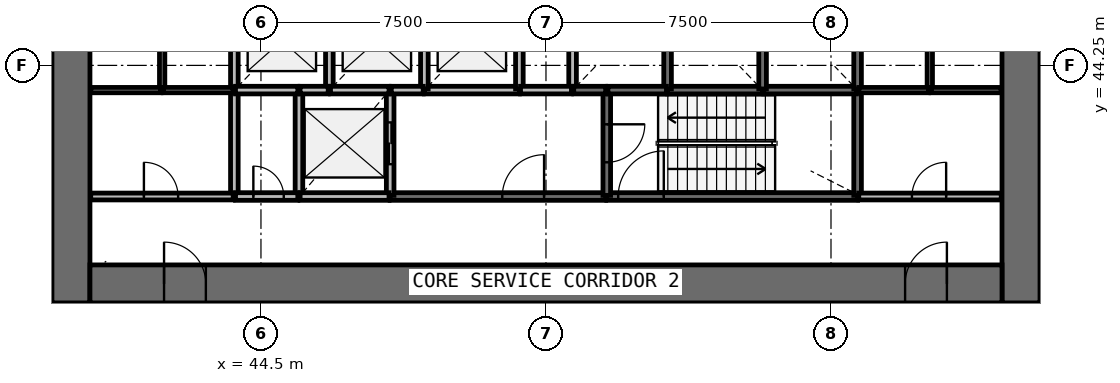
"""IFC4 building model, lengths in metres.
Left out: names, types, materials, properties, quantities, classifications, styles, units other than length and angle.
Written with IfcOpenShell. Run it as: python <this file> out.ifc"""

import sys

from ifc_helpers import new_model, si_unit, direction, frame, frame_2d, origin, place, context, subcontext, project, spatial, rectangle, extrude, source, transform, mapped, element, fill, save


model = new_model("IFC4")
c1 = context("Model", 3, precision=1e-05, world=origin(), true_north=direction((0.0, 1.0)))
c2 = subcontext(c1, "Body", "Model", "MODEL_VIEW")
j1 = project(units=[si_unit("LENGTHUNIT", "METRE"), si_unit("PLANEANGLEUNIT", "RADIAN")], contexts=[c1])
p1 = place(None, origin())
s1 = spatial("IfcSite", under=j1, at=p1, CompositionType="ELEMENT")
p2 = place(p1, origin())
s2 = spatial("IfcBuilding", under=s1, at=p2, CompositionType="ELEMENT")
p3 = place(p2, frame((0.0, 0.0, 5.0)))
s3 = spatial("IfcBuildingStorey", under=s2, at=p3, CompositionType="ELEMENT", Elevation=5.0)
p4 = place(p3, frame((64.5, 38.0, 0.0), z_axis=(0.0, 0.0, 1.0), x_axis=(0.0, 1.0, 0.0)))
e1 = element("IfcWall", 1, at=p4, inside=s3, PredefinedType="SHEAR", context=c2, shape_type="SweptSolid", body=[
    extrude(rectangle(XDim=20.0, YDim=1.0, at=frame_2d((10.0, 0.0))), origin(), (0.0, 0.0, 1.0), 4.4),
])
p5 = place(p4, frame((9.1, 0.0, 0.0)))
e2 = element("IfcOpeningElement", 2, at=p5, cuts=e1, PredefinedType="OPENING", context=c2, shape_type="SweptSolid", body=[
    extrude(rectangle(XDim=1.8, YDim=2.1, at=frame_2d((0.9, 1.05))), frame((0.0, 0.51, 0.0), z_axis=(0.0, -1.0, 0.0), x_axis=(1.0, 0.0, 0.0)), (0.0, 0.0, 1.0), 1.02),
])
p6 = place(p3, frame((39.5, 58.0, 0.0), z_axis=(0.0, 0.0, 1.0), x_axis=(0.0, -1.0, 0.0)))
e3 = element("IfcWall", 3, at=p6, inside=s3, PredefinedType="SHEAR", context=c2, shape_type="SweptSolid", body=[
    extrude(rectangle(XDim=20.0, YDim=1.0, at=frame_2d((10.0, 0.0))), origin(), (0.0, 0.0, 1.0), 4.4),
])
p7 = place(p6, frame((9.1, 0.0, 0.0)))
e4 = element("IfcOpeningElement", 4, at=p7, cuts=e3, PredefinedType="OPENING", context=c2, shape_type="SweptSolid", body=[
    extrude(rectangle(XDim=1.8, YDim=2.1, at=frame_2d((0.9, 1.05))), frame((0.0, 0.51, 0.0), z_axis=(0.0, -1.0, 0.0), x_axis=(1.0, 0.0, 0.0)), (0.0, 0.0, 1.0), 1.02),
])
p8 = place(p3, frame((40.0, 38.5, 0.0), z_axis=(0.0, 0.0, 1.0), x_axis=(1.0, 0.0, 0.0)))
e5 = element("IfcWall", 5, at=p8, inside=s3, PredefinedType="SHEAR", context=c2, shape_type="SweptSolid", body=[
    extrude(rectangle(XDim=24.0, YDim=1.0, at=frame_2d((12.0, 0.0))), origin(), (0.0, 0.0, 1.0), 4.4),
])
p9 = place(p8, frame((21.45, 0.0, 0.0)))
e6 = element("IfcOpeningElement", 6, at=p9, cuts=e5, PredefinedType="OPENING", context=c2, shape_type="SweptSolid", body=[
    extrude(rectangle(XDim=1.1, YDim=2.1, at=frame_2d((0.55, 1.05))), frame((0.0, 0.51, 0.0), z_axis=(0.0, -1.0, 0.0), x_axis=(1.0, 0.0, 0.0)), (0.0, 0.0, 1.0), 1.02),
])
p10 = place(p8, frame((1.95, 0.0, 0.0)))
e7 = element("IfcOpeningElement", 7, at=p10, cuts=e5, PredefinedType="OPENING", context=c2, shape_type="SweptSolid", body=[
    extrude(rectangle(XDim=1.1, YDim=2.1, at=frame_2d((0.55, 1.05))), frame((0.0, 0.51, 0.0), z_axis=(0.0, -1.0, 0.0), x_axis=(1.0, 0.0, 0.0)), (0.0, 0.0, 1.0), 1.02),
])
p11 = place(p3, frame((53.6, 40.8, 0.0), z_axis=(0.0, 0.0, 1.0), x_axis=(1.0, 0.0, 0.0)))
e8 = element("IfcWall", 8, at=p11, inside=s3, PredefinedType="SOLIDWALL", context=c2, shape_type="SweptSolid", body=[
    extrude(rectangle(XDim=6.6, YDim=0.2, at=frame_2d((3.3, 0.0))), origin(), (0.0, 0.0, 1.0), 4.05),
])
p12 = place(p11, frame((0.3, 0.0, 0.0)))
e9 = element("IfcOpeningElement", 9, at=p12, cuts=e8, PredefinedType="OPENING", context=c2, shape_type="SweptSolid", body=[
    extrude(rectangle(XDim=1.2, YDim=2.1, at=frame_2d((0.6, 1.05))), frame((0.0, 0.11, 0.0), z_axis=(0.0, -1.0, 0.0), x_axis=(1.0, 0.0, 0.0)), (0.0, 0.0, 1.0), 0.22),
])
p13 = place(p3, frame((47.9, 40.8, 0.0), z_axis=(0.0, 0.0, 1.0), x_axis=(1.0, 0.0, 0.0)))
e10 = element("IfcWall", 10, at=p13, inside=s3, PredefinedType="SOLIDWALL", context=c2, shape_type="SweptSolid", body=[
    extrude(rectangle(XDim=5.67, YDim=0.2, at=frame_2d((2.835, 0.0))), origin(), (0.0, 0.0, 1.0), 4.05),
])
p14 = place(p13, frame((2.95, 0.0, 0.0)))
e11 = element("IfcOpeningElement", 11, at=p14, cuts=e10, PredefinedType="OPENING", context=c2, shape_type="SweptSolid", body=[
    extrude(rectangle(XDim=1.1, YDim=2.1, at=frame_2d((0.55, 1.05))), frame((0.0, 0.11, 0.0), z_axis=(0.0, -1.0, 0.0), x_axis=(1.0, 0.0, 0.0)), (0.0, 0.0, 1.0), 0.22),
])
for number, where, z_axis, x_axis in (
    (12, (43.8, 43.6, 0.0), (0.0, 0.0, 1.0), (0.0, -1.0, 0.0)),
    (13, (45.5, 43.6, 0.0), (0.0, 0.0, 1.0), (0.0, -1.0, 0.0)),
):
    element("IfcWall", number, at=place(p3, frame(where, z_axis=z_axis, x_axis=x_axis)), inside=s3, PredefinedType="SOLIDWALL", context=c2, shape_type="SweptSolid", body=[
        extrude(rectangle(XDim=2.8, YDim=0.2, at=frame_2d((1.4, 0.0))), origin(), (0.0, 0.0, 1.0), 4.05),
    ])
p15 = place(p3, frame((47.9, 40.83, 0.0), z_axis=(0.0, 0.0, 1.0), x_axis=(0.0, 1.0, 0.0)))
e14 = element("IfcWall", 14, at=p15, inside=s3, PredefinedType="SOLIDWALL", context=c2, shape_type="SweptSolid", body=[
    extrude(rectangle(XDim=2.77, YDim=0.2, at=frame_2d((1.385, 0.0))), origin(), (0.0, 0.0, 1.0), 4.05),
])
p16 = place(p15, frame((0.82, 0.0, 0.0)))
e15 = element("IfcOpeningElement", 15, at=p16, cuts=e14, PredefinedType="OPENING", context=c2, shape_type="SweptSolid", body=[
    extrude(rectangle(XDim=1.1, YDim=2.1, at=frame_2d((0.55, 1.05))), frame((0.0, 0.11, 0.0), z_axis=(0.0, -1.0, 0.0), x_axis=(1.0, 0.0, 0.0)), (0.0, 0.0, 1.0), 0.22),
])
p17 = place(p3, frame((60.2, 40.83, 0.0), z_axis=(0.0, 0.0, 1.0), x_axis=(0.0, 1.0, 0.0)))
e16 = element("IfcWall", 16, at=p17, inside=s3, PredefinedType="SOLIDWALL", context=c2, shape_type="SweptSolid", body=[
    extrude(rectangle(XDim=2.77, YDim=0.2, at=frame_2d((1.385, 0.0))), origin(), (0.0, 0.0, 1.0), 4.05),
])
p18 = place(p3, frame((53.6, 43.6, 0.0), z_axis=(0.0, 0.0, 1.0), x_axis=(0.0, -1.0, 0.0)))
e17 = element("IfcWall", 17, at=p18, inside=s3, PredefinedType="SOLIDWALL", context=c2, shape_type="SweptSolid", body=[
    extrude(rectangle(XDim=2.77, YDim=0.2, at=frame_2d((1.385, 0.0))), origin(), (0.0, 0.0, 1.0), 4.05),
])
p19 = place(p18, frame((0.9, 0.0, 0.0)))
e18 = element("IfcOpeningElement", 18, at=p19, cuts=e17, PredefinedType="OPENING", context=c2, shape_type="SweptSolid", body=[
    extrude(rectangle(XDim=1.0, YDim=2.1, at=frame_2d((0.5, 1.05))), frame((0.0, 0.11, 0.0), z_axis=(0.0, -1.0, 0.0), x_axis=(1.0, 0.0, 0.0)), (0.0, 0.0, 1.0), 0.22),
])
for number, where, z_axis, x_axis in (
    (19, (48.8, 43.6, 0.0), (0.0, 0.0, 1.0), (1.0, 0.0, 0.0)),
    (20, (55.2, 43.6, 0.0), (0.0, 0.0, 1.0), (1.0, 0.0, 0.0)),
):
    element("IfcWall", number, at=place(p3, frame(where, z_axis=z_axis, x_axis=x_axis)), inside=s3, PredefinedType="SOLIDWALL", context=c2, shape_type="SweptSolid", body=[
        extrude(rectangle(XDim=2.5, YDim=0.2, at=frame_2d((1.25, 0.0))), origin(), (0.0, 0.0, 1.0), 4.05),
    ])
p20 = place(p3, frame((57.73, 43.6, 0.0), z_axis=(0.0, 0.0, 1.0), x_axis=(1.0, 0.0, 0.0)))
e21 = element("IfcWall", 21, at=p20, inside=s3, PredefinedType="SOLIDWALL", context=c2, shape_type="SweptSolid", body=[
    extrude(rectangle(XDim=2.44, YDim=0.2, at=frame_2d((1.22, 0.0))), origin(), (0.0, 0.0, 1.0), 4.05),
])
p21 = place(p3, frame((45.53, 40.8, 0.0), z_axis=(0.0, 0.0, 1.0), x_axis=(1.0, 0.0, 0.0)))
e22 = element("IfcWall", 22, at=p21, inside=s3, PredefinedType="SOLIDWALL", context=c2, shape_type="SweptSolid", body=[
    extrude(rectangle(XDim=2.34, YDim=0.2, at=frame_2d((1.17, 0.0))), origin(), (0.0, 0.0, 1.0), 4.05),
])
p22 = place(p3, frame((43.8, 45.99, 0.0), z_axis=(0.0, 0.0, 1.0), x_axis=(0.0, -1.0, 0.0)))
e23 = element("IfcWall", 23, at=p22, inside=s3, PredefinedType="SOLIDWALL", context=c2, shape_type="SweptSolid", body=[
    extrude(rectangle(XDim=2.36, YDim=0.2, at=frame_2d((1.18, 0.0))), origin(), (0.0, 0.0, 1.0), 4.05),
])
p23 = place(p3, frame((46.3, 43.6, 0.0), z_axis=(0.0, 0.0, 1.0), x_axis=(0.0, 1.0, 0.0)))
e24 = element("IfcWall", 24, at=p23, inside=s3, PredefinedType="SOLIDWALL", context=c2, shape_type="SweptSolid", body=[
    extrude(rectangle(XDim=2.39, YDim=0.2, at=frame_2d((1.195, 0.0))), origin(), (0.0, 0.0, 1.0), 4.05),
])
for number, where, z_axis, x_axis in (
    (25, (48.8, 43.63, 0.0), (0.0, 0.0, 1.0), (0.0, 1.0, 0.0)),
    (26, (51.3, 43.63, 0.0), (0.0, 0.0, 1.0), (0.0, 1.0, 0.0)),
):
    element("IfcWall", number, at=place(p3, frame(where, z_axis=z_axis, x_axis=x_axis)), inside=s3, PredefinedType="SOLIDWALL", context=c2, shape_type="SweptSolid", body=[
        extrude(rectangle(XDim=2.36, YDim=0.2, at=frame_2d((1.18, 0.0))), origin(), (0.0, 0.0, 1.0), 4.05),
    ])
p24 = place(p3, frame((52.7, 45.99, 0.0), z_axis=(0.0, 0.0, 1.0), x_axis=(0.0, -1.0, 0.0)))
e27 = element("IfcWall", 27, at=p24, inside=s3, PredefinedType="SOLIDWALL", context=c2, shape_type="SweptSolid", body=[
    extrude(rectangle(XDim=2.39, YDim=0.2, at=frame_2d((1.195, 0.0))), origin(), (0.0, 0.0, 1.0), 4.05),
])
for number, where, z_axis, x_axis in (
    (28, (55.2, 43.63, 0.0), (0.0, 0.0, 1.0), (0.0, 1.0, 0.0)),
    (29, (57.7, 43.63, 0.0), (0.0, 0.0, 1.0), (0.0, 1.0, 0.0)),
    (30, (60.2, 43.63, 0.0), (0.0, 0.0, 1.0), (0.0, 1.0, 0.0)),
):
    element("IfcWall", number, at=place(p3, frame(where, z_axis=z_axis, x_axis=x_axis)), inside=s3, PredefinedType="SOLIDWALL", context=c2, shape_type="SweptSolid", body=[
        extrude(rectangle(XDim=2.36, YDim=0.2, at=frame_2d((1.18, 0.0))), origin(), (0.0, 0.0, 1.0), 4.05),
    ])
p25 = place(p3, frame((43.83, 43.6, 0.0), z_axis=(0.0, 0.0, 1.0), x_axis=(1.0, 0.0, 0.0)))
e31 = element("IfcWall", 31, at=p25, inside=s3, PredefinedType="SOLIDWALL", context=c2, shape_type="SweptSolid", body=[
    extrude(rectangle(XDim=1.64, YDim=0.2, at=frame_2d((0.82, 0.0))), origin(), (0.0, 0.0, 1.0), 4.05),
])
p26 = place(p3, frame((43.83, 40.8, 0.0), z_axis=(0.0, 0.0, 1.0), x_axis=(1.0, 0.0, 0.0)))
e32 = element("IfcWall", 32, at=p26, inside=s3, PredefinedType="SOLIDWALL", context=c2, shape_type="SweptSolid", body=[
    extrude(rectangle(XDim=1.64, YDim=0.2, at=frame_2d((0.82, 0.0))), origin(), (0.0, 0.0, 1.0), 4.05),
])
p27 = place(p26, frame((0.47, 0.0, 0.0)))
e33 = element("IfcOpeningElement", 33, at=p27, cuts=e32, PredefinedType="OPENING", context=c2, shape_type="SweptSolid", body=[
    extrude(rectangle(XDim=0.8, YDim=2.1, at=frame_2d((0.4, 1.05))), frame((0.0, 0.11, 0.0), z_axis=(0.0, -1.0, 0.0), x_axis=(1.0, 0.0, 0.0)), (0.0, 0.0, 1.0), 0.22),
])
for number, where, z_axis, x_axis in (
    (34, (46.33, 43.6, 0.0), (0.0, 0.0, 1.0), (1.0, 0.0, 0.0)),
    (35, (53.63, 43.6, 0.0), (0.0, 0.0, 1.0), (1.0, 0.0, 0.0)),
):
    element("IfcWall", number, at=place(p3, frame(where, z_axis=z_axis, x_axis=x_axis)), inside=s3, PredefinedType="SOLIDWALL", context=c2, shape_type="SweptSolid", body=[
        extrude(rectangle(XDim=1.54, YDim=0.2, at=frame_2d((0.77, 0.0))), origin(), (0.0, 0.0, 1.0), 4.05),
    ])
p28 = place(p3, frame((52.67, 43.6, 0.0), z_axis=(0.0, 0.0, 1.0), x_axis=(-1.0, 0.0, 0.0)))
e36 = element("IfcWall", 36, at=p28, inside=s3, PredefinedType="SOLIDWALL", context=c2, shape_type="SweptSolid", body=[
    extrude(rectangle(XDim=1.34, YDim=0.2, at=frame_2d((0.67, 0.0))), origin(), (0.0, 0.0, 1.0), 4.05),
])
for number, where, z_axis, x_axis in (
    (37, (47.93, 43.6, 0.0), (0.0, 0.0, 1.0), (1.0, 0.0, 0.0)),
    (38, (52.73, 43.6, 0.0), (0.0, 0.0, 1.0), (1.0, 0.0, 0.0)),
):
    element("IfcWall", number, at=place(p3, frame(where, z_axis=z_axis, x_axis=x_axis)), inside=s3, PredefinedType="SOLIDWALL", context=c2, shape_type="SweptSolid", body=[
        extrude(rectangle(XDim=0.84, YDim=0.2, at=frame_2d((0.42, 0.0))), origin(), (0.0, 0.0, 1.0), 4.05),
    ])
p29 = place(p3, frame((45.53, 43.6, 0.0), z_axis=(0.0, 0.0, 1.0), x_axis=(1.0, 0.0, 0.0)))
e39 = element("IfcWall", 39, at=p29, inside=s3, PredefinedType="SOLIDWALL", context=c2, shape_type="SweptSolid", body=[
    extrude(rectangle(XDim=0.74, YDim=0.2, at=frame_2d((0.37, 0.0))), origin(), (0.0, 0.0, 1.0), 4.05),
])
p30 = place(p3, frame((40.02, 40.8, 0.0), z_axis=(0.0, 0.0, 1.0), x_axis=(1.0, 0.0, 0.0)))
e40 = element("IfcWall", 40, at=p30, inside=s3, PredefinedType="PARTITIONING", context=c2, shape_type="SweptSolid", body=[
    extrude(rectangle(XDim=3.75, YDim=0.18, at=frame_2d((1.875, 0.0))), origin(), (0.0, 0.0, 1.0), 4.05),
])
p31 = place(p30, frame((1.4, 0.0, 0.0)))
e41 = element("IfcOpeningElement", 41, at=p31, cuts=e40, PredefinedType="OPENING", context=c2, shape_type="SweptSolid", body=[
    extrude(rectangle(XDim=0.9, YDim=2.1, at=frame_2d((0.45, 1.05))), frame((0.0, 0.1, 0.0), z_axis=(0.0, -1.0, 0.0), x_axis=(1.0, 0.0, 0.0)), (0.0, 0.0, 1.0), 0.2),
])
p32 = place(p3, frame((60.23, 40.8, 0.0), z_axis=(0.0, 0.0, 1.0), x_axis=(1.0, 0.0, 0.0)))
e42 = element("IfcWall", 42, at=p32, inside=s3, PredefinedType="PARTITIONING", context=c2, shape_type="SweptSolid", body=[
    extrude(rectangle(XDim=3.75, YDim=0.18, at=frame_2d((1.875, 0.0))), origin(), (0.0, 0.0, 1.0), 4.05),
])
p33 = place(p32, frame((1.4, 0.0, 0.0)))
e43 = element("IfcOpeningElement", 43, at=p33, cuts=e42, PredefinedType="OPENING", context=c2, shape_type="SweptSolid", body=[
    extrude(rectangle(XDim=0.9, YDim=2.1, at=frame_2d((0.45, 1.05))), frame((0.0, 0.1, 0.0), z_axis=(0.0, -1.0, 0.0), x_axis=(1.0, 0.0, 0.0)), (0.0, 0.0, 1.0), 0.2),
])
for number, where, z_axis, x_axis in (
    (44, (41.9, 43.6, 0.0), (0.0, 0.0, 1.0), (0.0, 1.0, 0.0)),
    (45, (62.1, 43.6, 0.0), (0.0, 0.0, 1.0), (0.0, 1.0, 0.0)),
):
    element("IfcWall", number, at=place(p3, frame(where, z_axis=z_axis, x_axis=x_axis)), inside=s3, PredefinedType="PARTITIONING", context=c2, shape_type="SweptSolid", body=[
        extrude(rectangle(XDim=2.39, YDim=0.14, at=frame_2d((1.195, 0.0))), origin(), (0.0, 0.0, 1.0), 3.25),
    ])
for number, where, z_axis, x_axis in (
    (46, (43.77, 43.6, 0.0), (0.0, 0.0, 1.0), (-1.0, 0.0, 0.0)),
    (47, (60.23, 43.6, 0.0), (0.0, 0.0, 1.0), (1.0, 0.0, 0.0)),
):
    element("IfcWall", number, at=place(p3, frame(where, z_axis=z_axis, x_axis=x_axis)), inside=s3, PredefinedType="PARTITIONING", context=c2, shape_type="SweptSolid", body=[
        extrude(rectangle(XDim=1.84, YDim=0.14, at=frame_2d((0.92, 0.0))), origin(), (0.0, 0.0, 1.0), 3.25),
    ])
for number, where, z_axis, x_axis in (
    (48, (41.87, 43.6, 0.0), (0.0, 0.0, 1.0), (-1.0, 0.0, 0.0)),
    (49, (62.13, 43.6, 0.0), (0.0, 0.0, 1.0), (1.0, 0.0, 0.0)),
):
    element("IfcWall", number, at=place(p3, frame(where, z_axis=z_axis, x_axis=x_axis)), inside=s3, PredefinedType="PARTITIONING", context=c2, shape_type="SweptSolid", body=[
        extrude(rectangle(XDim=1.85, YDim=0.14, at=frame_2d((0.925, 0.0))), origin(), (0.0, 0.0, 1.0), 3.25),
    ])
m1 = source(origin(), c2, "Body", "SweptSolid", [
    extrude(rectangle(XDim=1.1, YDim=2.1, at=frame_2d((0.55, 1.05))), frame((0.0, 0.025, 0.0), z_axis=(0.0, -1.0, 0.0), x_axis=(1.0, 0.0, 0.0)), (0.0, 0.0, 1.0), 0.05),
])
p34 = place(p16, origin())
e50 = element("IfcDoor", 50, at=p34, inside=s3, OperationType="DOUBLE_DOOR_SLIDING", PredefinedType="USERDEFINED", context=c2, shape_type="MappedRepresentation", body=[
    mapped(m1, transform((0.0, 0.0, 0.0), scale=1.0)),
])
fill(e15, e50)
m2 = source(origin(), c2, "Body", "SweptSolid", [
    extrude(rectangle(XDim=1.2, YDim=2.1, at=frame_2d((0.6, 1.05))), frame((0.0, 0.025, 0.0), z_axis=(0.0, -1.0, 0.0), x_axis=(1.0, 0.0, 0.0)), (0.0, 0.0, 1.0), 0.05),
])
p35 = place(p12, origin())
e51 = element("IfcDoor", 51, at=p35, inside=s3, OperationType="SINGLE_SWING_RIGHT", PredefinedType="DOOR", context=c2, shape_type="MappedRepresentation", body=[
    mapped(m2, transform((0.0, 0.0, 0.0), scale=1.0)),
])
fill(e9, e51)
m3 = source(origin(), c2, "Body", "SweptSolid", [
    extrude(rectangle(XDim=1.0, YDim=2.1, at=frame_2d((0.5, 1.05))), frame((0.0, 0.025, 0.0), z_axis=(0.0, -1.0, 0.0), x_axis=(1.0, 0.0, 0.0)), (0.0, 0.0, 1.0), 0.05),
])
p36 = place(p19, origin())
e52 = element("IfcDoor", 52, at=p36, inside=s3, OperationType="SINGLE_SWING_LEFT", PredefinedType="DOOR", context=c2, shape_type="MappedRepresentation", body=[
    mapped(m3, transform((0.0, 0.0, 0.0), scale=1.0)),
])
fill(e18, e52)
m4 = source(origin(), c2, "Body", "SweptSolid", [
    extrude(rectangle(XDim=1.1, YDim=2.1, at=frame_2d((0.55, 1.05))), frame((0.0, 0.025, 0.0), z_axis=(0.0, -1.0, 0.0), x_axis=(1.0, 0.0, 0.0)), (0.0, 0.0, 1.0), 0.05),
])
p37 = place(p14, origin())
e53 = element("IfcDoor", 53, at=p37, inside=s3, OperationType="SINGLE_SWING_RIGHT", PredefinedType="DOOR", context=c2, shape_type="MappedRepresentation", body=[
    mapped(m4, transform((0.0, 0.0, 0.0), scale=1.0)),
])
fill(e11, e53)
m5 = source(origin(), c2, "Body", "SweptSolid", [
    extrude(rectangle(XDim=0.8, YDim=2.1, at=frame_2d((0.4, 1.05))), frame((0.0, 0.025, 0.0), z_axis=(0.0, -1.0, 0.0), x_axis=(1.0, 0.0, 0.0)), (0.0, 0.0, 1.0), 0.05),
])
p38 = place(p27, origin())
e54 = element("IfcDoor", 54, at=p38, inside=s3, OperationType="SINGLE_SWING_LEFT", PredefinedType="DOOR", context=c2, shape_type="MappedRepresentation", body=[
    mapped(m5, transform((0.0, 0.0, 0.0), scale=1.0)),
])
fill(e33, e54)
m6 = source(origin(), c2, "Body", "SweptSolid", [
    extrude(rectangle(XDim=1.1, YDim=2.1, at=frame_2d((0.55, 1.05))), frame((0.0, 0.025, 0.0), z_axis=(0.0, -1.0, 0.0), x_axis=(1.0, 0.0, 0.0)), (0.0, 0.0, 1.0), 0.05),
])
p39 = place(p9, origin())
e55 = element("IfcDoor", 55, at=p39, inside=s3, OperationType="SINGLE_SWING_RIGHT", PredefinedType="DOOR", context=c2, shape_type="MappedRepresentation", body=[
    mapped(m6, transform((0.0, 0.0, 0.0), scale=1.0)),
])
fill(e6, e55)
p40 = place(p10, origin())
e56 = element("IfcDoor", 56, at=p40, inside=s3, OperationType="SINGLE_SWING_LEFT", PredefinedType="DOOR", context=c2, shape_type="MappedRepresentation", body=[
    mapped(m6, transform((0.0, 0.0, 0.0), scale=1.0)),
])
fill(e7, e56)
m7 = source(origin(), c2, "Body", "SweptSolid", [
    extrude(rectangle(XDim=0.9, YDim=2.1, at=frame_2d((0.45, 1.05))), frame((0.0, 0.025, 0.0), z_axis=(0.0, -1.0, 0.0), x_axis=(1.0, 0.0, 0.0)), (0.0, 0.0, 1.0), 0.05),
])
p41 = place(p31, origin())
e57 = element("IfcDoor", 57, at=p41, inside=s3, OperationType="SINGLE_SWING_LEFT", PredefinedType="DOOR", context=c2, shape_type="MappedRepresentation", body=[
    mapped(m7, transform((0.0, 0.0, 0.0), scale=1.0)),
])
fill(e41, e57)
p42 = place(p33, origin())
e58 = element("IfcDoor", 58, at=p42, inside=s3, OperationType="SINGLE_SWING_RIGHT", PredefinedType="DOOR", context=c2, shape_type="MappedRepresentation", body=[
    mapped(m7, transform((0.0, 0.0, 0.0), scale=1.0)),
])
fill(e43, e58)
save(model, sys.argv[1])
